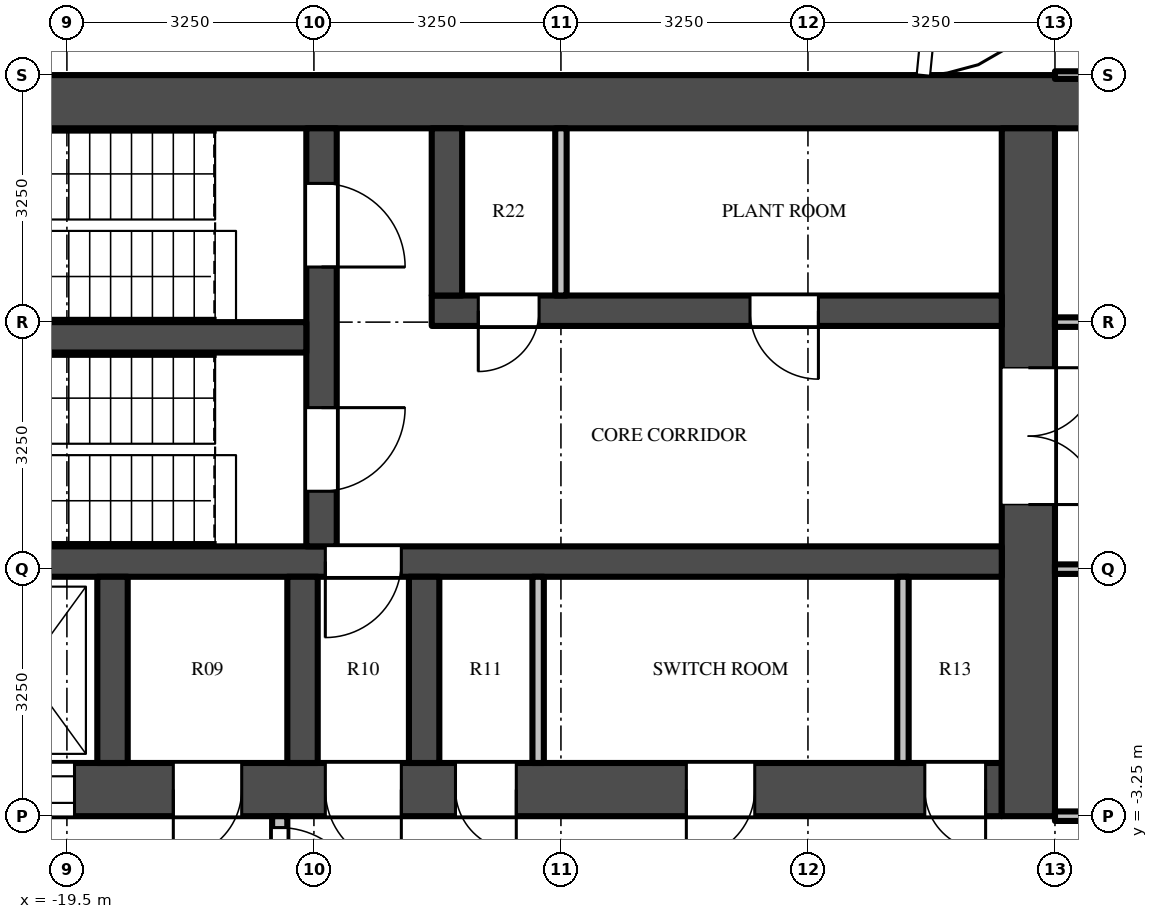
"""IFC4 building model, lengths in metres.
Left out: names, types, materials, properties, quantities, classifications, styles, units other than length and angle.
Written with IfcOpenShell. Run it as: python <this file> out.ifc"""

import sys

from ifc_helpers import new_model, si_unit, direction, frame, frame_2d, origin, place, context, subcontext, project, spatial, rectangle, extrude, source, transform, mapped, element, fill, save


model = new_model("IFC4")
c1 = context("Model", 3, precision=1e-05, world=origin(), true_north=direction((0.0, 1.0)))
c2 = subcontext(c1, "Body", "Model", "MODEL_VIEW")
j1 = project(units=[si_unit("LENGTHUNIT", "METRE"), si_unit("PLANEANGLEUNIT", "RADIAN")], contexts=[c1])
p1 = place(None, origin())
s1 = spatial("IfcSite", under=j1, at=p1, CompositionType="ELEMENT")
p2 = place(p1, origin())
s2 = spatial("IfcBuilding", under=s1, at=p2, CompositionType="ELEMENT")
p3 = place(p2, frame((0.0, 0.0, 338.1)))
s3 = spatial("IfcBuildingStorey", under=s2, at=p3, CompositionType="ELEMENT", Elevation=338.1)
m1 = source(origin(), c2, "Body", "SweptSolid", [
    extrude(rectangle(XDim=16.7, YDim=0.7, at=frame_2d((8.35, 0.0))), origin(), (0.0, 0.0, 1.0), 3.75),
])
p4 = place(p3, frame((-6.05, 6.15, 0.0), z_axis=(0.0, 0.0, 1.0), x_axis=(-1.0, 0.0, 0.0)))
e1 = element("IfcWall", 1, at=p4, inside=s3, PredefinedType="SHEAR", context=c2, shape_type="MappedRepresentation", body=[
    mapped(m1, transform((0.0, 0.0, 0.0))),
])
m2 = source(origin(), c2, "Body", "SweptSolid", [
    extrude(rectangle(XDim=14.85, YDim=0.7, at=frame_2d((7.425, 0.0))), origin(), (0.0, 0.0, 1.0), 3.75),
])
p5 = place(p3, frame((-7.2, -2.9, 0.0), z_axis=(0.0, 0.0, 1.0), x_axis=(-1.0, 0.0, 0.0)))
e2 = element("IfcWall", 2, at=p5, inside=s3, PredefinedType="SHEAR", context=c2, shape_type="MappedRepresentation", body=[
    mapped(m2, transform((0.0, 0.0, 0.0))),
])
m3 = source(origin(), c2, "Body", "SweptSolid", [
    extrude(rectangle(XDim=1.3, YDim=2.1, at=frame_2d((0.65, 1.05))), frame((0.0, 0.36, 0.0), z_axis=(0.0, -1.0, 0.0), x_axis=(1.0, 0.0, 0.0)), (0.0, 0.0, 1.0), 0.72),
])
p6 = place(p5, frame((12.2, 0.0, 0.0)))
e3 = element("IfcOpeningElement", 3, at=p6, cuts=e2, PredefinedType="OPENING", context=c2, shape_type="MappedRepresentation", body=[
    mapped(m3, transform((0.0, 0.0, 0.0))),
])
m4 = source(origin(), c2, "Body", "SweptSolid", [
    extrude(rectangle(XDim=1.0, YDim=2.1, at=frame_2d((0.5, 1.05))), frame((0.0, 0.36, 0.0), z_axis=(0.0, -1.0, 0.0), x_axis=(1.0, 0.0, 0.0)), (0.0, 0.0, 1.0), 0.72),
])
p7 = place(p5, frame((7.9, 0.0, 0.0)))
e4 = element("IfcOpeningElement", 4, at=p7, cuts=e2, PredefinedType="OPENING", context=c2, shape_type="MappedRepresentation", body=[
    mapped(m4, transform((0.0, 0.0, 0.0))),
])
m5 = source(origin(), c2, "Body", "SweptSolid", [
    extrude(rectangle(XDim=0.8, YDim=2.1, at=frame_2d((0.4, 1.05))), frame((0.0, 0.36, 0.0), z_axis=(0.0, -1.0, 0.0), x_axis=(1.0, 0.0, 0.0)), (0.0, 0.0, 1.0), 0.72),
])
p8 = place(p5, frame((0.212, 0.0, 0.0)))
e5 = element("IfcOpeningElement", 5, at=p8, cuts=e2, PredefinedType="OPENING", context=c2, shape_type="MappedRepresentation", body=[
    mapped(m5, transform((0.0, 0.0, 0.0))),
])
m6 = source(origin(), c2, "Body", "SweptSolid", [
    extrude(rectangle(XDim=0.9, YDim=2.1, at=frame_2d((0.45, 1.05))), frame((0.0, 0.36, 0.0), z_axis=(0.0, -1.0, 0.0), x_axis=(1.0, 0.0, 0.0)), (0.0, 0.0, 1.0), 0.72),
])
p9 = place(p5, frame((3.25, 0.0, 0.0)))
e6 = element("IfcOpeningElement", 6, at=p9, cuts=e2, PredefinedType="OPENING", context=c2, shape_type="MappedRepresentation", body=[
    mapped(m6, transform((0.0, 0.0, 0.0))),
])
p10 = place(p5, frame((6.387, 0.0, 0.0)))
e7 = element("IfcOpeningElement", 7, at=p10, cuts=e2, PredefinedType="OPENING", context=c2, shape_type="MappedRepresentation", body=[
    mapped(m5, transform((0.0, 0.0, 0.0))),
])
p11 = place(p5, frame((10.0, 0.0, 0.0)))
e8 = element("IfcOpeningElement", 8, at=p11, cuts=e2, PredefinedType="OPENING", context=c2, shape_type="MappedRepresentation", body=[
    mapped(m6, transform((0.0, 0.0, 0.0))),
])
m7 = source(origin(), c2, "Body", "SweptSolid", [
    extrude(rectangle(XDim=9.05, YDim=0.7, at=frame_2d((4.525, 0.0))), origin(), (0.0, 0.0, 1.0), 3.75),
])
p12 = place(p3, frame((-6.85, 5.8, 0.0), z_axis=(0.0, 0.0, 1.0), x_axis=(0.0, -1.0, 0.0)))
e9 = element("IfcWall", 9, at=p12, inside=s3, PredefinedType="SHEAR", context=c2, shape_type="MappedRepresentation", body=[
    mapped(m7, transform((0.0, 0.0, 0.0))),
])
m8 = source(origin(), c2, "Body", "SweptSolid", [
    extrude(rectangle(XDim=1.8, YDim=2.1, at=frame_2d((0.9, 1.05))), frame((0.0, 0.36, 0.0), z_axis=(0.0, -1.0, 0.0), x_axis=(1.0, 0.0, 0.0)), (0.0, 0.0, 1.0), 0.72),
])
p13 = place(p12, frame((3.15, 0.0, 0.0)))
e10 = element("IfcOpeningElement", 10, at=p13, cuts=e9, PredefinedType="OPENING", context=c2, shape_type="MappedRepresentation", body=[
    mapped(m8, transform((0.0, 0.0, 0.0))),
])
m9 = source(origin(), c2, "Body", "SweptSolid", [
    extrude(rectangle(XDim=7.5, YDim=0.4, at=frame_2d((3.75, 0.0))), origin(), (0.0, 0.0, 1.0), 3.75),
])
p14 = place(p3, frame((-7.2, 3.4, 0.0), z_axis=(0.0, 0.0, 1.0), x_axis=(-1.0, 0.0, 0.0)))
e11 = element("IfcWall", 11, at=p14, inside=s3, PredefinedType="SHEAR", context=c2, shape_type="MappedRepresentation", body=[
    mapped(m9, transform((0.0, 0.0, 0.0))),
])
m10 = source(origin(), c2, "Body", "SweptSolid", [
    extrude(rectangle(XDim=0.9, YDim=2.1, at=frame_2d((0.45, 1.05))), frame((0.0, 0.21, 0.0), z_axis=(0.0, -1.0, 0.0), x_axis=(1.0, 0.0, 0.0)), (0.0, 0.0, 1.0), 0.42),
])
p15 = place(p14, frame((2.413, 0.0, 0.0)))
e12 = element("IfcOpeningElement", 12, at=p15, cuts=e11, PredefinedType="OPENING", context=c2, shape_type="MappedRepresentation", body=[
    mapped(m10, transform((0.0, 0.0, 0.0))),
])
m11 = source(origin(), c2, "Body", "SweptSolid", [
    extrude(rectangle(XDim=0.8, YDim=2.1, at=frame_2d((0.4, 1.05))), frame((0.0, 0.21, 0.0), z_axis=(0.0, -1.0, 0.0), x_axis=(1.0, 0.0, 0.0)), (0.0, 0.0, 1.0), 0.42),
])
p16 = place(p14, frame((6.087, 0.0, 0.0)))
e13 = element("IfcOpeningElement", 13, at=p16, cuts=e11, PredefinedType="OPENING", context=c2, shape_type="MappedRepresentation", body=[
    mapped(m11, transform((0.0, 0.0, 0.0))),
])
m12 = source(origin(), c2, "Body", "SweptSolid", [
    extrude(rectangle(XDim=14.85, YDim=0.4, at=frame_2d((7.425, 0.0))), origin(), (0.0, 0.0, 1.0), 3.75),
])
p17 = place(p3, frame((-7.2, 0.1, 0.0), z_axis=(0.0, 0.0, 1.0), x_axis=(-1.0, 0.0, 0.0)))
e14 = element("IfcWall", 14, at=p17, inside=s3, PredefinedType="SHEAR", context=c2, shape_type="MappedRepresentation", body=[
    mapped(m12, transform((0.0, 0.0, 0.0))),
])
m13 = source(origin(), c2, "Body", "SweptSolid", [
    extrude(rectangle(XDim=1.0, YDim=2.1, at=frame_2d((0.5, 1.05))), frame((0.0, 0.21, 0.0), z_axis=(0.0, -1.0, 0.0), x_axis=(1.0, 0.0, 0.0)), (0.0, 0.0, 1.0), 0.42),
])
p18 = place(p17, frame((7.9, 0.0, 0.0)))
e15 = element("IfcOpeningElement", 15, at=p18, cuts=e14, PredefinedType="OPENING", context=c2, shape_type="MappedRepresentation", body=[
    mapped(m13, transform((0.0, 0.0, 0.0))),
])
m14 = source(origin(), c2, "Body", "SweptSolid", [
    extrude(rectangle(XDim=5.5, YDim=0.4, at=frame_2d((2.75, 0.0))), origin(), (0.0, 0.0, 1.0), 3.75),
])
p19 = place(p3, frame((-16.15, 5.8, 0.0), z_axis=(0.0, 0.0, 1.0), x_axis=(0.0, -1.0, 0.0)))
e16 = element("IfcWall", 16, at=p19, inside=s3, PredefinedType="SHEAR", context=c2, shape_type="MappedRepresentation", body=[
    mapped(m14, transform((0.0, 0.0, 0.0))),
])
m15 = source(origin(), c2, "Body", "SweptSolid", [
    extrude(rectangle(XDim=1.1, YDim=2.1, at=frame_2d((0.55, 1.05))), frame((0.0, 0.21, 0.0), z_axis=(0.0, -1.0, 0.0), x_axis=(1.0, 0.0, 0.0)), (0.0, 0.0, 1.0), 0.42),
])
p20 = place(p19, frame((0.725, 0.0, 0.0)))
e17 = element("IfcOpeningElement", 17, at=p20, cuts=e16, PredefinedType="OPENING", context=c2, shape_type="MappedRepresentation", body=[
    mapped(m15, transform((0.0, 0.0, 0.0))),
])
p21 = place(p19, frame((3.675, 0.0, 0.0)))
e18 = element("IfcOpeningElement", 18, at=p21, cuts=e16, PredefinedType="OPENING", context=c2, shape_type="MappedRepresentation", body=[
    mapped(m15, transform((0.0, 0.0, 0.0))),
])
m16 = source(origin(), c2, "Body", "SweptSolid", [
    extrude(rectangle(XDim=5.7, YDim=0.4, at=frame_2d((2.85, 0.0))), origin(), (0.0, 0.0, 1.0), 3.75),
])
p22 = place(p3, frame((-16.35, 3.05, 0.0), z_axis=(0.0, 0.0, 1.0), x_axis=(-1.0, 0.0, 0.0)))
e19 = element("IfcWall", 19, at=p22, inside=s3, PredefinedType="SHEAR", context=c2, shape_type="MappedRepresentation", body=[
    mapped(m16, transform((0.0, 0.0, 0.0))),
])
m17 = source(origin(), c2, "Body", "SweptSolid", [
    extrude(rectangle(XDim=2.2, YDim=0.4, at=frame_2d((1.1, 0.0))), origin(), (0.0, 0.0, 1.0), 3.75),
])
p23 = place(p3, frame((-14.5, 5.8, 0.0), z_axis=(0.0, 0.0, 1.0), x_axis=(0.0, -1.0, 0.0)))
e20 = element("IfcWall", 20, at=p23, inside=s3, PredefinedType="SHEAR", context=c2, shape_type="MappedRepresentation", body=[
    mapped(m17, transform((0.0, 0.0, 0.0))),
])
m18 = source(origin(), c2, "Body", "SweptSolid", [
    extrude(rectangle(XDim=2.45, YDim=0.4, at=frame_2d((1.225, 0.0))), origin(), (0.0, 0.0, 1.0), 3.75),
])
for number, where, z_axis, x_axis in (
    (21, (-14.8, -0.1, 0.0), (0.0, 0.0, 1.0), (0.0, -1.0, 0.0)),
    (22, (-16.4, -0.1, 0.0), (0.0, 0.0, 1.0), (0.0, -1.0, 0.0)),
    (23, (-18.9, -0.1, 0.0), (0.0, 0.0, 1.0), (0.0, -1.0, 0.0)),
):
    element("IfcWall", number, at=place(p3, frame(where, z_axis=z_axis, x_axis=x_axis)), inside=s3, PredefinedType="SHEAR", context=c2, shape_type="MappedRepresentation", body=[
        mapped(m18, transform((0.0, 0.0, 0.0))),
    ])
m19 = source(origin(), c2, "Body", "SweptSolid", [
    extrude(rectangle(XDim=3.25, YDim=0.2, at=frame_2d((1.625, 0.0))), origin(), (0.0, 0.0, 1.0), 3.75),
])
p24 = place(p3, frame((-16.7, -3.25, 0.0), z_axis=(0.0, 0.0, 1.0), x_axis=(0.0, -1.0, 0.0)))
e24 = element("IfcWall", 24, at=p24, inside=s3, PredefinedType="PARTITIONING", context=c2, shape_type="MappedRepresentation", body=[
    mapped(m19, transform((0.0, 0.0, 0.0))),
])
m20 = source(origin(), c2, "Body", "SweptSolid", [
    extrude(rectangle(XDim=1.1, YDim=2.1, at=frame_2d((0.55, 1.05))), frame((0.0, 0.11, 0.0), z_axis=(0.0, -1.0, 0.0), x_axis=(1.0, 0.0, 0.0)), (0.0, 0.0, 1.0), 0.22),
])
p25 = place(p24, frame((0.15, 0.0, 0.0)))
e25 = element("IfcOpeningElement", 25, at=p25, cuts=e24, PredefinedType="OPENING", context=c2, shape_type="MappedRepresentation", body=[
    mapped(m20, transform((0.0, 0.0, 0.0))),
])
m21 = source(origin(), c2, "Body", "SweptSolid", [
    extrude(rectangle(XDim=2.2, YDim=0.15, at=frame_2d((1.1, 0.0))), origin(), (0.0, 0.0, 1.0), 3.75),
])
p26 = place(p3, frame((-13.0, 5.8, 0.0), z_axis=(0.0, 0.0, 1.0), x_axis=(0.0, -1.0, 0.0)))
e26 = element("IfcWall", 26, at=p26, inside=s3, PredefinedType="PARTITIONING", context=c2, shape_type="MappedRepresentation", body=[
    mapped(m21, transform((0.0, 0.0, 0.0))),
])
m22 = source(origin(), c2, "Body", "SweptSolid", [
    extrude(rectangle(XDim=2.45, YDim=0.15, at=frame_2d((1.225, 0.0))), origin(), (0.0, 0.0, 1.0), 3.75),
])
for number, where, z_axis, x_axis in (
    (27, (-8.5, -0.1, 0.0), (0.0, 0.0, 1.0), (0.0, -1.0, 0.0)),
    (28, (-13.3, -0.1, 0.0), (0.0, 0.0, 1.0), (0.0, -1.0, 0.0)),
):
    element("IfcWall", number, at=place(p3, frame(where, z_axis=z_axis, x_axis=x_axis)), inside=s3, PredefinedType="PARTITIONING", context=c2, shape_type="MappedRepresentation", body=[
        mapped(m22, transform((0.0, 0.0, 0.0))),
    ])
m23 = source(origin(), c2, "Body", "SweptSolid", [
    extrude(rectangle(XDim=5.363, YDim=0.125, at=frame_2d((2.681, 0.0))), origin(), (0.0, 0.0, 1.0), 3.046),
])
p27 = place(p3, frame((-1.137, -3.25, 0.0), z_axis=(0.0, 0.0, 1.0), x_axis=(-1.0, 0.0, 0.0)))
e29 = element("IfcWall", 29, at=p27, inside=s3, PredefinedType="PARTITIONING", context=c2, shape_type="MappedRepresentation", body=[
    mapped(m23, transform((0.0, 0.0, 0.0))),
])
m24 = source(origin(), c2, "Body", "SweptSolid", [
    extrude(rectangle(XDim=1.0, YDim=2.1, at=frame_2d((0.5, 1.05))), frame((0.0, 0.073, 0.0), z_axis=(0.0, -1.0, 0.0), x_axis=(1.0, 0.0, 0.0)), (0.0, 0.0, 1.0), 0.145),
])
p28 = place(p27, frame((4.012, 0.0, 0.0)))
e30 = element("IfcOpeningElement", 30, at=p28, cuts=e29, PredefinedType="OPENING", context=c2, shape_type="MappedRepresentation", body=[
    mapped(m24, transform((0.0, 0.0, 0.0))),
])
p29 = place(p3, frame((-1.137, 0.0, 0.0), z_axis=(0.0, 0.0, 1.0), x_axis=(-1.0, 0.0, 0.0)))
e31 = element("IfcWall", 31, at=p29, inside=s3, PredefinedType="PARTITIONING", context=c2, shape_type="MappedRepresentation", body=[
    mapped(m23, transform((0.0, 0.0, 0.0))),
])
p30 = place(p3, frame((-6.5, 3.25, 0.0), z_axis=(0.0, 0.0, 1.0), x_axis=(1.0, 0.0, 0.0)))
e32 = element("IfcWall", 32, at=p30, inside=s3, PredefinedType="PARTITIONING", context=c2, shape_type="MappedRepresentation", body=[
    mapped(m23, transform((0.0, 0.0, 0.0))),
])
p31 = place(p30, frame((3.95, 0.0, 0.0)))
e33 = element("IfcOpeningElement", 33, at=p31, cuts=e32, PredefinedType="OPENING", context=c2, shape_type="MappedRepresentation", body=[
    mapped(m24, transform((0.0, 0.0, 0.0))),
])
m25 = source(origin(), c2, "Body", "SweptSolid", [
    extrude(rectangle(XDim=5.363, YDim=0.1, at=frame_2d((2.681, 0.0))), origin(), (0.0, 0.0, 1.0), 2.83),
])
p32 = place(p3, frame((-6.5, 6.5, 0.0), z_axis=(0.0, 0.0, 1.0), x_axis=(1.0, 0.0, 0.0)))
e34 = element("IfcWall", 34, at=p32, inside=s3, PredefinedType="PARTITIONING", context=c2, shape_type="MappedRepresentation", body=[
    mapped(m25, transform((0.0, 0.0, 0.0))),
])
m26 = source(origin(), c2, "Body", "SweptSolid", [
    extrude(rectangle(XDim=1.3, YDim=2.1, at=frame_2d((0.65, 1.05))), frame((0.0, -0.275, 0.0), z_axis=(0.0, -1.0, 0.0), x_axis=(1.0, 0.0, 0.0)), (0.0, 0.0, 1.0), 0.05),
])
p33 = place(p6, origin())
e35 = element("IfcDoor", 35, at=p33, inside=s3, OperationType="DOUBLE_DOOR_SLIDING", PredefinedType="DOOR", context=c2, shape_type="MappedRepresentation", body=[
    mapped(m26, transform((0.0, 0.0, 0.0))),
])
fill(e3, e35)
m27 = source(origin(), c2, "Body", "SweptSolid", [
    extrude(rectangle(XDim=1.8, YDim=2.1, at=frame_2d((0.9, 1.05))), frame((0.0, -0.275, 0.0), z_axis=(0.0, -1.0, 0.0), x_axis=(1.0, 0.0, 0.0)), (0.0, 0.0, 1.0), 0.05),
])
p34 = place(p13, origin())
e36 = element("IfcDoor", 36, at=p34, inside=s3, OperationType="DOUBLE_DOOR_SINGLE_SWING", PredefinedType="DOOR", context=c2, shape_type="MappedRepresentation", body=[
    mapped(m27, transform((0.0, 0.0, 0.0))),
])
fill(e10, e36)
m28 = source(origin(), c2, "Body", "SweptSolid", [
    extrude(rectangle(XDim=1.1, YDim=2.1, at=frame_2d((0.55, 1.05))), frame((0.0, 0.025, 0.0), z_axis=(0.0, -1.0, 0.0), x_axis=(1.0, 0.0, 0.0)), (0.0, 0.0, 1.0), 0.05),
])
p35 = place(p20, origin())
e37 = element("IfcDoor", 37, at=p35, inside=s3, OperationType="SINGLE_SWING_RIGHT", PredefinedType="DOOR", context=c2, shape_type="MappedRepresentation", body=[
    mapped(m28, transform((0.0, 0.0, 0.0))),
])
fill(e17, e37)
p36 = place(p21, origin())
e38 = element("IfcDoor", 38, at=p36, inside=s3, OperationType="SINGLE_SWING_LEFT", PredefinedType="DOOR", context=c2, shape_type="MappedRepresentation", body=[
    mapped(m28, transform((0.0, 0.0, 0.0))),
])
fill(e18, e38)
m29 = source(origin(), c2, "Body", "SweptSolid", [
    extrude(rectangle(XDim=1.0, YDim=2.1, at=frame_2d((0.5, 1.05))), frame((0.0, 0.025, 0.0), z_axis=(0.0, -1.0, 0.0), x_axis=(1.0, 0.0, 0.0)), (0.0, 0.0, 1.0), 0.05),
])
p37 = place(p18, origin())
e39 = element("IfcDoor", 39, at=p37, inside=s3, OperationType="SINGLE_SWING_RIGHT", PredefinedType="DOOR", context=c2, shape_type="MappedRepresentation", body=[
    mapped(m29, transform((0.0, 0.0, 0.0))),
])
fill(e15, e39)
m30 = source(origin(), c2, "Body", "SweptSolid", [
    extrude(rectangle(XDim=1.0, YDim=2.1, at=frame_2d((0.5, 1.05))), frame((0.0, -0.275, 0.0), z_axis=(0.0, -1.0, 0.0), x_axis=(1.0, 0.0, 0.0)), (0.0, 0.0, 1.0), 0.05),
])
p38 = place(p7, origin())
e40 = element("IfcDoor", 40, at=p38, inside=s3, OperationType="SINGLE_SWING_LEFT", PredefinedType="DOOR", context=c2, shape_type="MappedRepresentation", body=[
    mapped(m30, transform((0.0, 0.0, 0.0))),
])
fill(e4, e40)
p39 = place(p25, origin())
e41 = element("IfcDoor", 41, at=p39, inside=s3, OperationType="SINGLE_SWING_RIGHT", PredefinedType="DOOR", context=c2, shape_type="MappedRepresentation", body=[
    mapped(m28, transform((0.0, 0.0, 0.0))),
])
fill(e25, e41)
m31 = source(origin(), c2, "Body", "SweptSolid", [
    extrude(rectangle(XDim=0.9, YDim=2.1, at=frame_2d((0.45, 1.05))), frame((0.0, 0.025, 0.0), z_axis=(0.0, -1.0, 0.0), x_axis=(1.0, 0.0, 0.0)), (0.0, 0.0, 1.0), 0.05),
])
p40 = place(p15, origin())
e42 = element("IfcDoor", 42, at=p40, inside=s3, OperationType="SINGLE_SWING_LEFT", PredefinedType="DOOR", context=c2, shape_type="MappedRepresentation", body=[
    mapped(m31, transform((0.0, 0.0, 0.0))),
])
fill(e12, e42)
m32 = source(origin(), c2, "Body", "SweptSolid", [
    extrude(rectangle(XDim=0.8, YDim=2.1, at=frame_2d((0.4, 1.05))), frame((0.0, 0.025, 0.0), z_axis=(0.0, -1.0, 0.0), x_axis=(1.0, 0.0, 0.0)), (0.0, 0.0, 1.0), 0.05),
])
p41 = place(p16, origin())
e43 = element("IfcDoor", 43, at=p41, inside=s3, OperationType="SINGLE_SWING_RIGHT", PredefinedType="DOOR", context=c2, shape_type="MappedRepresentation", body=[
    mapped(m32, transform((0.0, 0.0, 0.0))),
])
fill(e13, e43)
m33 = source(origin(), c2, "Body", "SweptSolid", [
    extrude(rectangle(XDim=0.8, YDim=2.1, at=frame_2d((0.4, 1.05))), frame((0.0, -0.275, 0.0), z_axis=(0.0, -1.0, 0.0), x_axis=(1.0, 0.0, 0.0)), (0.0, 0.0, 1.0), 0.05),
])
p42 = place(p8, origin())
e44 = element("IfcDoor", 44, at=p42, inside=s3, OperationType="SINGLE_SWING_LEFT", PredefinedType="DOOR", context=c2, shape_type="MappedRepresentation", body=[
    mapped(m33, transform((0.0, 0.0, 0.0))),
])
fill(e5, e44)
m34 = source(origin(), c2, "Body", "SweptSolid", [
    extrude(rectangle(XDim=0.9, YDim=2.1, at=frame_2d((0.45, 1.05))), frame((0.0, -0.275, 0.0), z_axis=(0.0, -1.0, 0.0), x_axis=(1.0, 0.0, 0.0)), (0.0, 0.0, 1.0), 0.05),
])
p43 = place(p9, origin())
e45 = element("IfcDoor", 45, at=p43, inside=s3, OperationType="SINGLE_SWING_RIGHT", PredefinedType="DOOR", context=c2, shape_type="MappedRepresentation", body=[
    mapped(m34, transform((0.0, 0.0, 0.0))),
])
fill(e6, e45)
p44 = place(p10, origin())
e46 = element("IfcDoor", 46, at=p44, inside=s3, OperationType="SINGLE_SWING_LEFT", PredefinedType="DOOR", context=c2, shape_type="MappedRepresentation", body=[
    mapped(m33, transform((0.0, 0.0, 0.0))),
])
fill(e7, e46)
p45 = place(p11, origin())
e47 = element("IfcDoor", 47, at=p45, inside=s3, OperationType="SINGLE_SWING_RIGHT", PredefinedType="DOOR", context=c2, shape_type="MappedRepresentation", body=[
    mapped(m34, transform((0.0, 0.0, 0.0))),
])
fill(e8, e47)
save(model, sys.argv[1])
